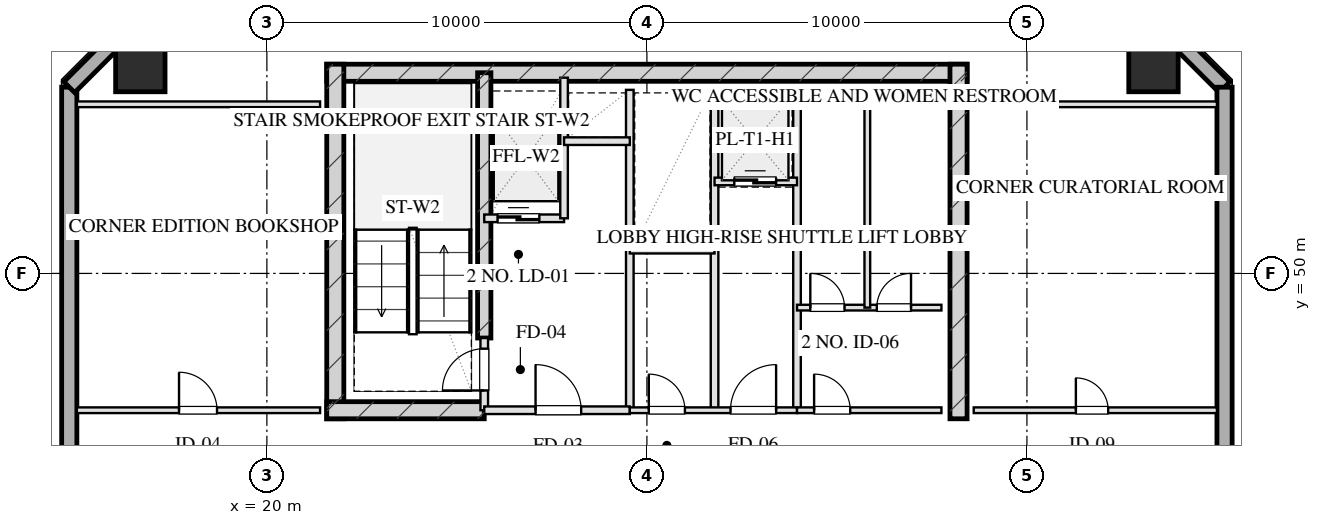
"""IFC4 building model, lengths in metres.
Left out: names, types, materials, properties, quantities, classifications, styles, units other than length and angle.
Written with IfcOpenShell. Run it as: python <this file> out.ifc"""

import sys

from ifc_helpers import new_model, si_unit, direction, frame, frame_2d, origin, origin_2d, place, context, subcontext, project, spatial, rectangle, hollow_rectangle, extrude, element, fill, save


model = new_model("IFC4")
c1 = context("Model", 3, precision=1e-05, world=origin(), true_north=direction((0.0, 1.0)))
c2 = subcontext(c1, "Body", "Model", "MODEL_VIEW")
j1 = project(units=[si_unit("LENGTHUNIT", "METRE"), si_unit("PLANEANGLEUNIT", "RADIAN")], contexts=[c1])
p1 = place(None, origin())
s1 = spatial("IfcSite", under=j1, at=p1, CompositionType="ELEMENT")
p2 = place(p1, origin())
s2 = spatial("IfcBuilding", under=s1, at=p2, CompositionType="ELEMENT")
p3 = place(p2, frame((0.0, 0.0, 247.2)))
s3 = spatial("IfcBuildingStorey", under=s2, at=p3, CompositionType="ELEMENT", Elevation=247.2)
p4 = place(p3, frame((21.575, 55.28, 0.0), z_axis=(0.0, 0.0, 1.0), x_axis=(1.0, 0.0, 0.0)))
e1 = element("IfcWall", 1, at=p4, inside=s3, PredefinedType="SHEAR", context=c2, shape_type="SweptSolid", body=[
    extrude(rectangle(XDim=16.85, YDim=0.45, at=frame_2d((8.425, 0.0))), origin(), (0.0, 0.0, 1.0), 3.2),
])
for number, where, z_axis, x_axis in (
    (2, (21.8, 46.175, 0.0), (0.0, 0.0, 1.0), (0.0, 1.0, 0.0)),
    (3, (38.2, 46.175, 0.0), (0.0, 0.0, 1.0), (0.0, 1.0, 0.0)),
):
    element("IfcWall", number, at=place(p3, frame(where, z_axis=z_axis, x_axis=x_axis)), inside=s3, PredefinedType="SHEAR", context=c2, shape_type="SweptSolid", body=[
        extrude(rectangle(XDim=9.33, YDim=0.45, at=frame_2d((4.665, 0.0))), origin(), (0.0, 0.0, 1.0), 3.2),
    ])
p5 = place(p3, frame((25.72, 48.3, 0.0), z_axis=(0.0, 0.0, 1.0), x_axis=(0.0, 1.0, 0.0)))
e4 = element("IfcWall", 4, at=p5, inside=s3, PredefinedType="SHEAR", context=c2, shape_type="SweptSolid", body=[
    extrude(rectangle(XDim=6.98, YDim=0.35, at=frame_2d((3.49, 0.0))), origin(), (0.0, 0.0, 1.0), 3.2),
])
p6 = place(p3, frame((21.575, 46.4, 0.0), z_axis=(0.0, 0.0, 1.0), x_axis=(1.0, 0.0, 0.0)))
e5 = element("IfcWall", 5, at=p6, inside=s3, PredefinedType="SHEAR", context=c2, shape_type="SweptSolid", body=[
    extrude(rectangle(XDim=4.145, YDim=0.45, at=frame_2d((2.073, 0.0))), origin(), (0.0, 0.0, 1.0), 3.2),
])
for number, where, z_axis, x_axis in (
    (6, (43.33, 55.43, 0.0), (0.0, 0.0, 1.0), (1.0, 0.0, 0.0)),
    (7, (16.67, 55.43, 0.0), (0.0, 0.0, 1.0), (1.0, 0.0, 0.0)),
):
    element("IfcColumn", number, at=place(p3, frame(where, z_axis=z_axis, x_axis=x_axis)), inside=s3, PredefinedType="COLUMN", context=c2, shape_type="SweptSolid", body=[
        extrude(hollow_rectangle(XDim=1.3, YDim=1.3, WallThickness=0.045, at=origin_2d()), origin(), (0.0, 0.0, 1.0), 3.201),
    ])
p7 = place(p3, frame((14.8, 13.1, 0.0), z_axis=(0.0, 0.0, 1.0), x_axis=(0.0, 1.0, 0.0)))
e8 = element("IfcWall", 8, at=p7, inside=s3, PredefinedType="SOLIDWALL", context=c2, shape_type="SweptSolid", body=[
    extrude(rectangle(XDim=41.8, YDim=0.4, at=frame_2d((20.9, 0.0))), origin(), (0.0, 0.0, 1.0), 2.36),
])
p8 = place(p7, frame((13.525, 0.0, 0.75)))
e9 = element("IfcOpeningElement", 9, at=p8, cuts=e8, PredefinedType="OPENING", context=c2, shape_type="SweptSolid", body=[
    extrude(rectangle(XDim=1.95, YDim=1.21, at=frame_2d((0.975, 0.605))), frame((0.0, 0.21, 0.0), z_axis=(0.0, -1.0, 0.0), x_axis=(1.0, 0.0, 0.0)), (0.0, 0.0, 1.0), 0.42),
])
p9 = place(p7, frame((17.325, 0.0, 0.75)))
e10 = element("IfcOpeningElement", 10, at=p9, cuts=e8, PredefinedType="OPENING", context=c2, shape_type="SweptSolid", body=[
    extrude(rectangle(XDim=1.95, YDim=1.21, at=frame_2d((0.975, 0.605))), frame((0.0, 0.21, 0.0), z_axis=(0.0, -1.0, 0.0), x_axis=(1.0, 0.0, 0.0)), (0.0, 0.0, 1.0), 0.42),
])
p10 = place(p7, frame((23.2, 0.0, 0.0)))
e11 = element("IfcOpeningElement", 11, at=p10, cuts=e8, PredefinedType="OPENING", context=c2, shape_type="SweptSolid", body=[
    extrude(rectangle(XDim=1.1, YDim=2.15, at=frame_2d((0.55, 1.075))), frame((0.0, 0.21, 0.0), z_axis=(0.0, -1.0, 0.0), x_axis=(1.0, 0.0, 0.0)), (0.0, 0.0, 1.0), 0.42),
])
for number, where, z_axis, x_axis in (
    (12, (14.8, 54.9, 0.0), (0.0, 0.0, 1.0), (0.707, 0.707, 0.0)),
    (13, (42.8, 57.3, 0.0), (0.0, 0.0, 1.0), (0.707, -0.707, 0.0)),
):
    element("IfcWall", number, at=place(p3, frame(where, z_axis=z_axis, x_axis=x_axis)), inside=s3, PredefinedType="SOLIDWALL", context=c2, shape_type="SweptSolid", body=[
        extrude(rectangle(XDim=3.394, YDim=0.4, at=frame_2d((1.697, 0.0))), origin(), (0.0, 0.0, 1.0), 2.36),
    ])
p11 = place(p3, frame((45.2, 54.9, 0.0), z_axis=(0.0, 0.0, 1.0), x_axis=(0.0, -1.0, 0.0)))
e14 = element("IfcWall", 14, at=p11, inside=s3, PredefinedType="SOLIDWALL", context=c2, shape_type="SweptSolid", body=[
    extrude(rectangle(XDim=41.8, YDim=0.4, at=frame_2d((20.9, 0.0))), origin(), (0.0, 0.0, 1.0), 2.36),
])
p12 = place(p11, frame((26.325, 0.0, 0.75)))
e15 = element("IfcOpeningElement", 15, at=p12, cuts=e14, PredefinedType="OPENING", context=c2, shape_type="SweptSolid", body=[
    extrude(rectangle(XDim=1.95, YDim=1.21, at=frame_2d((0.975, 0.605))), frame((0.0, 0.21, 0.0), z_axis=(0.0, -1.0, 0.0), x_axis=(1.0, 0.0, 0.0)), (0.0, 0.0, 1.0), 0.42),
])
p13 = place(p11, frame((22.525, 0.0, 0.75)))
e16 = element("IfcOpeningElement", 16, at=p13, cuts=e14, PredefinedType="OPENING", context=c2, shape_type="SweptSolid", body=[
    extrude(rectangle(XDim=1.95, YDim=1.21, at=frame_2d((0.975, 0.605))), frame((0.0, 0.21, 0.0), z_axis=(0.0, -1.0, 0.0), x_axis=(1.0, 0.0, 0.0)), (0.0, 0.0, 1.0), 0.42),
])
p14 = place(p11, frame((17.5, 0.0, 0.0)))
e17 = element("IfcOpeningElement", 17, at=p14, cuts=e14, PredefinedType="OPENING", context=c2, shape_type="SweptSolid", body=[
    extrude(rectangle(XDim=1.1, YDim=2.15, at=frame_2d((0.55, 1.075))), frame((0.0, 0.21, 0.0), z_axis=(0.0, -1.0, 0.0), x_axis=(1.0, 0.0, 0.0)), (0.0, 0.0, 1.0), 0.42),
])
p15 = place(p3, frame((25.72, 46.4, 0.0), z_axis=(0.0, 0.0, 1.0), x_axis=(0.0, 1.0, 0.0)))
e18 = element("IfcWall", 18, at=p15, inside=s3, PredefinedType="PARTITIONING", context=c2, shape_type="SweptSolid", body=[
    extrude(rectangle(XDim=1.9, YDim=0.2, at=frame_2d((0.95, 0.0))), origin(), (0.0, 0.0, 1.0), 2.925),
])
p16 = place(p15, frame((0.52, 0.0, 0.0)))
e19 = element("IfcOpeningElement", 19, at=p16, cuts=e18, PredefinedType="OPENING", context=c2, shape_type="SweptSolid", body=[
    extrude(rectangle(XDim=1.1, YDim=2.05, at=frame_2d((0.55, 1.025))), frame((0.0, 0.11, 0.0), z_axis=(0.0, -1.0, 0.0), x_axis=(1.0, 0.0, 0.0)), (0.0, 0.0, 1.0), 0.22),
])
p17 = place(p3, frame((29.55, 46.4, 0.0), z_axis=(0.0, 0.0, 1.0), x_axis=(0.0, 1.0, 0.0)))
e20 = element("IfcWall", 20, at=p17, inside=s3, PredefinedType="PARTITIONING", context=c2, shape_type="SweptSolid", body=[
    extrude(rectangle(XDim=8.43, YDim=0.2, at=frame_2d((4.215, 0.0))), origin(), (0.0, 0.0, 1.0), 2.925),
])
p18 = place(p3, frame((25.72, 46.4, 0.0), z_axis=(0.0, 0.0, 1.0), x_axis=(1.0, 0.0, 0.0)))
e21 = element("IfcWall", 21, at=p18, inside=s3, PredefinedType="PARTITIONING", context=c2, shape_type="SweptSolid", body=[
    extrude(rectangle(XDim=3.83, YDim=0.2, at=frame_2d((1.915, 0.0))), origin(), (0.0, 0.0, 1.0), 2.925),
])
p19 = place(p18, frame((1.35, 0.0, 0.0)))
e22 = element("IfcOpeningElement", 22, at=p19, cuts=e21, PredefinedType="OPENING", context=c2, shape_type="SweptSolid", body=[
    extrude(rectangle(XDim=1.2, YDim=2.05, at=frame_2d((0.6, 1.025))), frame((0.0, 0.11, 0.0), z_axis=(0.0, -1.0, 0.0), x_axis=(1.0, 0.0, 0.0)), (0.0, 0.0, 1.0), 0.22),
])
p20 = place(p3, frame((25.72, 51.45, 0.0), z_axis=(0.0, 0.0, 1.0), x_axis=(1.0, 0.0, 0.0)))
e23 = element("IfcWall", 23, at=p20, inside=s3, PredefinedType="PARTITIONING", context=c2, shape_type="SweptSolid", body=[
    extrude(rectangle(XDim=2.1, YDim=0.2, at=frame_2d((1.05, 0.0))), origin(), (0.0, 0.0, 1.0), 2.925),
])
p21 = place(p20, frame((0.35, 0.0, 0.0)))
e24 = element("IfcOpeningElement", 24, at=p21, cuts=e23, PredefinedType="OPENING", context=c2, shape_type="SweptSolid", body=[
    extrude(rectangle(XDim=1.1, YDim=2.05, at=frame_2d((0.55, 1.025))), frame((0.0, 0.11, 0.0), z_axis=(0.0, -1.0, 0.0), x_axis=(1.0, 0.0, 0.0)), (0.0, 0.0, 1.0), 0.22),
])
p22 = place(p3, frame((27.82, 51.45, 0.0), z_axis=(0.0, 0.0, 1.0), x_axis=(0.0, 1.0, 0.0)))
e25 = element("IfcWall", 25, at=p22, inside=s3, PredefinedType="PARTITIONING", context=c2, shape_type="SweptSolid", body=[
    extrude(rectangle(XDim=3.7, YDim=0.2, at=frame_2d((1.85, 0.0))), origin(), (0.0, 0.0, 1.0), 2.925),
])
p23 = place(p3, frame((27.82, 53.48, 0.0), z_axis=(0.0, 0.0, 1.0), x_axis=(1.0, 0.0, 0.0)))
e26 = element("IfcWall", 26, at=p23, inside=s3, PredefinedType="PARTITIONING", context=c2, shape_type="SweptSolid", body=[
    extrude(rectangle(XDim=1.73, YDim=0.2, at=frame_2d((0.865, 0.0))), origin(), (0.0, 0.0, 1.0), 2.925),
])
for number, where, z_axis, x_axis in (
    (27, (33.95, 46.4, 0.0), (0.0, 0.0, 1.0), (0.0, 1.0, 0.0)),
    (28, (31.78, 46.4, 0.0), (0.0, 0.0, 1.0), (0.0, 1.0, 0.0)),
):
    element("IfcWall", number, at=place(p3, frame(where, z_axis=z_axis, x_axis=x_axis)), inside=s3, PredefinedType="PARTITIONING", context=c2, shape_type="SweptSolid", body=[
        extrude(rectangle(XDim=8.43, YDim=0.2, at=frame_2d((4.215, 0.0))), origin(), (0.0, 0.0, 1.0), 2.925),
    ])
p24 = place(p3, frame((29.55, 46.4, 0.0), z_axis=(0.0, 0.0, 1.0), x_axis=(1.0, 0.0, 0.0)))
e29 = element("IfcWall", 29, at=p24, inside=s3, PredefinedType="PARTITIONING", context=c2, shape_type="SweptSolid", body=[
    extrude(rectangle(XDim=4.4, YDim=0.15, at=frame_2d((2.2, 0.0))), origin(), (0.0, 0.0, 1.0), 2.925),
])
p25 = place(p24, frame((0.5, 0.0, 0.0)))
e30 = element("IfcOpeningElement", 30, at=p25, cuts=e29, PredefinedType="OPENING", context=c2, shape_type="SweptSolid", body=[
    extrude(rectangle(XDim=0.95, YDim=2.05, at=frame_2d((0.475, 1.025))), frame((0.0, 0.085, 0.0), z_axis=(0.0, -1.0, 0.0), x_axis=(1.0, 0.0, 0.0)), (0.0, 0.0, 1.0), 0.17),
])
p26 = place(p24, frame((2.65, 0.0, 0.0)))
e31 = element("IfcOpeningElement", 31, at=p26, cuts=e29, PredefinedType="OPENING", context=c2, shape_type="SweptSolid", body=[
    extrude(rectangle(XDim=1.2, YDim=2.05, at=frame_2d((0.6, 1.025))), frame((0.0, 0.085, 0.0), z_axis=(0.0, -1.0, 0.0), x_axis=(1.0, 0.0, 0.0)), (0.0, 0.0, 1.0), 0.17),
])
p27 = place(p3, frame((29.55, 50.6, 0.0), z_axis=(0.0, 0.0, 1.0), x_axis=(1.0, 0.0, 0.0)))
e32 = element("IfcWall", 32, at=p27, inside=s3, PredefinedType="PARTITIONING", context=c2, shape_type="SweptSolid", body=[
    extrude(rectangle(XDim=2.23, YDim=0.15, at=frame_2d((1.115, 0.0))), origin(), (0.0, 0.0, 1.0), 2.925),
])
p28 = place(p3, frame((31.78, 52.42, 0.0), z_axis=(0.0, 0.0, 1.0), x_axis=(1.0, 0.0, 0.0)))
e33 = element("IfcWall", 33, at=p28, inside=s3, PredefinedType="PARTITIONING", context=c2, shape_type="SweptSolid", body=[
    extrude(rectangle(XDim=2.17, YDim=0.2, at=frame_2d((1.085, 0.0))), origin(), (0.0, 0.0, 1.0), 2.925),
])
p29 = place(p28, frame((0.52, 0.0, 0.0)))
e34 = element("IfcOpeningElement", 34, at=p29, cuts=e33, PredefinedType="OPENING", context=c2, shape_type="SweptSolid", body=[
    extrude(rectangle(XDim=1.1, YDim=2.05, at=frame_2d((0.55, 1.025))), frame((0.0, 0.11, 0.0), z_axis=(0.0, -1.0, 0.0), x_axis=(1.0, 0.0, 0.0)), (0.0, 0.0, 1.0), 0.22),
])
p30 = place(p3, frame((33.95, 46.4, 0.0), z_axis=(0.0, 0.0, 1.0), x_axis=(1.0, 0.0, 0.0)))
e35 = element("IfcWall", 35, at=p30, inside=s3, PredefinedType="PARTITIONING", context=c2, shape_type="SweptSolid", body=[
    extrude(rectangle(XDim=3.8, YDim=0.15, at=frame_2d((1.9, 0.0))), origin(), (0.0, 0.0, 1.0), 2.925),
])
p31 = place(p30, frame((0.45, 0.0, 0.0)))
e36 = element("IfcOpeningElement", 36, at=p31, cuts=e35, PredefinedType="OPENING", context=c2, shape_type="SweptSolid", body=[
    extrude(rectangle(XDim=0.95, YDim=2.05, at=frame_2d((0.475, 1.025))), frame((0.0, 0.085, 0.0), z_axis=(0.0, -1.0, 0.0), x_axis=(1.0, 0.0, 0.0)), (0.0, 0.0, 1.0), 0.17),
])
p32 = place(p3, frame((33.95, 49.1, 0.0), z_axis=(0.0, 0.0, 1.0), x_axis=(1.0, 0.0, 0.0)))
e37 = element("IfcWall", 37, at=p32, inside=s3, PredefinedType="PARTITIONING", context=c2, shape_type="SweptSolid", body=[
    extrude(rectangle(XDim=3.8, YDim=0.15, at=frame_2d((1.9, 0.0))), origin(), (0.0, 0.0, 1.0), 2.925),
])
p33 = place(p32, frame((0.35, 0.0, 0.0)))
e38 = element("IfcOpeningElement", 38, at=p33, cuts=e37, PredefinedType="OPENING", context=c2, shape_type="SweptSolid", body=[
    extrude(rectangle(XDim=0.9, YDim=2.05, at=frame_2d((0.45, 1.025))), frame((0.0, 0.085, 0.0), z_axis=(0.0, -1.0, 0.0), x_axis=(1.0, 0.0, 0.0)), (0.0, 0.0, 1.0), 0.17),
])
p34 = place(p32, frame((2.1, 0.0, 0.0)))
e39 = element("IfcOpeningElement", 39, at=p34, cuts=e37, PredefinedType="OPENING", context=c2, shape_type="SweptSolid", body=[
    extrude(rectangle(XDim=0.9, YDim=2.05, at=frame_2d((0.45, 1.025))), frame((0.0, 0.085, 0.0), z_axis=(0.0, -1.0, 0.0), x_axis=(1.0, 0.0, 0.0)), (0.0, 0.0, 1.0), 0.17),
])
p35 = place(p3, frame((35.8, 49.1, 0.0), z_axis=(0.0, 0.0, 1.0), x_axis=(0.0, 1.0, 0.0)))
e40 = element("IfcWall", 40, at=p35, inside=s3, PredefinedType="PARTITIONING", context=c2, shape_type="SweptSolid", body=[
    extrude(rectangle(XDim=5.73, YDim=0.15, at=frame_2d((2.865, 0.0))), origin(), (0.0, 0.0, 1.0), 2.925),
])
p36 = place(p3, frame((15.0, 54.45, 0.0), z_axis=(0.0, 0.0, 1.0), x_axis=(1.0, 0.0, 0.0)))
e41 = element("IfcWall", 41, at=p36, inside=s3, PredefinedType="PARTITIONING", context=c2, shape_type="SweptSolid", body=[
    extrude(rectangle(XDim=6.4, YDim=0.15, at=frame_2d((3.2, 0.0))), origin(), (0.0, 0.0, 1.0), 2.925),
])
p37 = place(p3, frame((15.0, 46.4, 0.0), z_axis=(0.0, 0.0, 1.0), x_axis=(1.0, 0.0, 0.0)))
e42 = element("IfcWall", 42, at=p37, inside=s3, PredefinedType="PARTITIONING", context=c2, shape_type="SweptSolid", body=[
    extrude(rectangle(XDim=6.4, YDim=0.15, at=frame_2d((3.2, 0.0))), origin(), (0.0, 0.0, 1.0), 2.925),
])
p38 = place(p37, frame((2.688, 0.0, 0.0)))
e43 = element("IfcOpeningElement", 43, at=p38, cuts=e42, PredefinedType="OPENING", context=c2, shape_type="SweptSolid", body=[
    extrude(rectangle(XDim=1.0, YDim=2.05, at=frame_2d((0.5, 1.025))), frame((0.0, 0.085, 0.0), z_axis=(0.0, -1.0, 0.0), x_axis=(1.0, 0.0, 0.0)), (0.0, 0.0, 1.0), 0.17),
])
p39 = place(p3, frame((38.6, 54.45, 0.0), z_axis=(0.0, 0.0, 1.0), x_axis=(1.0, 0.0, 0.0)))
e44 = element("IfcWall", 44, at=p39, inside=s3, PredefinedType="PARTITIONING", context=c2, shape_type="SweptSolid", body=[
    extrude(rectangle(XDim=6.4, YDim=0.15, at=frame_2d((3.2, 0.0))), origin(), (0.0, 0.0, 1.0), 2.925),
])
p40 = place(p3, frame((38.6, 46.4, 0.0), z_axis=(0.0, 0.0, 1.0), x_axis=(1.0, 0.0, 0.0)))
e45 = element("IfcWall", 45, at=p40, inside=s3, PredefinedType="PARTITIONING", context=c2, shape_type="SweptSolid", body=[
    extrude(rectangle(XDim=6.4, YDim=0.15, at=frame_2d((3.2, 0.0))), origin(), (0.0, 0.0, 1.0), 2.925),
])
p41 = place(p40, frame((2.688, 0.0, 0.0)))
e46 = element("IfcOpeningElement", 46, at=p41, cuts=e45, PredefinedType="OPENING", context=c2, shape_type="SweptSolid", body=[
    extrude(rectangle(XDim=0.85, YDim=2.05, at=frame_2d((0.425, 1.025))), frame((0.0, 0.085, 0.0), z_axis=(0.0, -1.0, 0.0), x_axis=(1.0, 0.0, 0.0)), (0.0, 0.0, 1.0), 0.17),
])
p42 = place(p16, origin())
e47 = element("IfcDoor", 47, at=p42, inside=s3, OperationType="SINGLE_SWING_LEFT", PredefinedType="DOOR", context=c2, shape_type="SweptSolid", body=[
    extrude(rectangle(XDim=1.1, YDim=2.05, at=frame_2d((0.55, 1.025))), frame((0.0, 0.025, 0.0), z_axis=(0.0, -1.0, 0.0), x_axis=(1.0, 0.0, 0.0)), (0.0, 0.0, 1.0), 0.05),
])
fill(e19, e47)
p43 = place(p19, origin())
e48 = element("IfcDoor", 48, at=p43, inside=s3, OperationType="SINGLE_SWING_LEFT", PredefinedType="DOOR", context=c2, shape_type="SweptSolid", body=[
    extrude(rectangle(XDim=1.2, YDim=2.05, at=frame_2d((0.6, 1.025))), frame((0.0, 0.025, 0.0), z_axis=(0.0, -1.0, 0.0), x_axis=(1.0, 0.0, 0.0)), (0.0, 0.0, 1.0), 0.05),
])
fill(e22, e48)
p44 = place(p21, origin())
e49 = element("IfcDoor", 49, at=p44, inside=s3, OperationType="DOUBLE_DOOR_SLIDING", PredefinedType="DOOR", context=c2, shape_type="SweptSolid", body=[
    extrude(rectangle(XDim=1.1, YDim=2.05, at=frame_2d((0.55, 1.025))), frame((0.0, 0.025, 0.0), z_axis=(0.0, -1.0, 0.0), x_axis=(1.0, 0.0, 0.0)), (0.0, 0.0, 1.0), 0.05),
])
fill(e24, e49)
p45 = place(p25, origin())
e50 = element("IfcDoor", 50, at=p45, inside=s3, OperationType="SINGLE_SWING_LEFT", PredefinedType="DOOR", context=c2, shape_type="SweptSolid", body=[
    extrude(rectangle(XDim=0.95, YDim=2.05, at=frame_2d((0.475, 1.025))), frame((0.0, 0.025, 0.0), z_axis=(0.0, -1.0, 0.0), x_axis=(1.0, 0.0, 0.0)), (0.0, 0.0, 1.0), 0.05),
])
fill(e30, e50)
p46 = place(p26, origin())
e51 = element("IfcDoor", 51, at=p46, inside=s3, OperationType="SINGLE_SWING_RIGHT", PredefinedType="DOOR", context=c2, shape_type="SweptSolid", body=[
    extrude(rectangle(XDim=1.2, YDim=2.05, at=frame_2d((0.6, 1.025))), frame((0.0, 0.025, 0.0), z_axis=(0.0, -1.0, 0.0), x_axis=(1.0, 0.0, 0.0)), (0.0, 0.0, 1.0), 0.05),
])
fill(e31, e51)
p47 = place(p29, origin())
e52 = element("IfcDoor", 52, at=p47, inside=s3, OperationType="DOUBLE_DOOR_SLIDING", PredefinedType="DOOR", context=c2, shape_type="SweptSolid", body=[
    extrude(rectangle(XDim=1.1, YDim=2.05, at=frame_2d((0.55, 1.025))), frame((0.0, 0.025, 0.0), z_axis=(0.0, -1.0, 0.0), x_axis=(1.0, 0.0, 0.0)), (0.0, 0.0, 1.0), 0.05),
])
fill(e34, e52)
p48 = place(p31, origin())
e53 = element("IfcDoor", 53, at=p48, inside=s3, OperationType="SINGLE_SWING_LEFT", PredefinedType="DOOR", context=c2, shape_type="SweptSolid", body=[
    extrude(rectangle(XDim=0.95, YDim=2.05, at=frame_2d((0.475, 1.025))), frame((0.0, 0.025, 0.0), z_axis=(0.0, -1.0, 0.0), x_axis=(1.0, 0.0, 0.0)), (0.0, 0.0, 1.0), 0.05),
])
fill(e36, e53)
p49 = place(p33, origin())
e54 = element("IfcDoor", 54, at=p49, inside=s3, OperationType="SINGLE_SWING_LEFT", PredefinedType="DOOR", context=c2, shape_type="SweptSolid", body=[
    extrude(rectangle(XDim=0.9, YDim=2.05, at=frame_2d((0.45, 1.025))), frame((0.0, 0.025, 0.0), z_axis=(0.0, -1.0, 0.0), x_axis=(1.0, 0.0, 0.0)), (0.0, 0.0, 1.0), 0.05),
])
fill(e38, e54)
p50 = place(p34, origin())
e55 = element("IfcDoor", 55, at=p50, inside=s3, OperationType="SINGLE_SWING_RIGHT", PredefinedType="DOOR", context=c2, shape_type="SweptSolid", body=[
    extrude(rectangle(XDim=0.9, YDim=2.05, at=frame_2d((0.45, 1.025))), frame((0.0, 0.025, 0.0), z_axis=(0.0, -1.0, 0.0), x_axis=(1.0, 0.0, 0.0)), (0.0, 0.0, 1.0), 0.05),
])
fill(e39, e55)
p51 = place(p38, origin())
e56 = element("IfcDoor", 56, at=p51, inside=s3, OperationType="SINGLE_SWING_LEFT", PredefinedType="DOOR", context=c2, shape_type="SweptSolid", body=[
    extrude(rectangle(XDim=1.0, YDim=2.05, at=frame_2d((0.5, 1.025))), frame((0.0, 0.025, 0.0), z_axis=(0.0, -1.0, 0.0), x_axis=(1.0, 0.0, 0.0)), (0.0, 0.0, 1.0), 0.05),
])
fill(e43, e56)
p52 = place(p41, origin())
e57 = element("IfcDoor", 57, at=p52, inside=s3, OperationType="SINGLE_SWING_LEFT", PredefinedType="DOOR", context=c2, shape_type="SweptSolid", body=[
    extrude(rectangle(XDim=0.85, YDim=2.05, at=frame_2d((0.425, 1.025))), frame((0.0, 0.025, 0.0), z_axis=(0.0, -1.0, 0.0), x_axis=(1.0, 0.0, 0.0)), (0.0, 0.0, 1.0), 0.05),
])
fill(e46, e57)
save(model, sys.argv[1])
